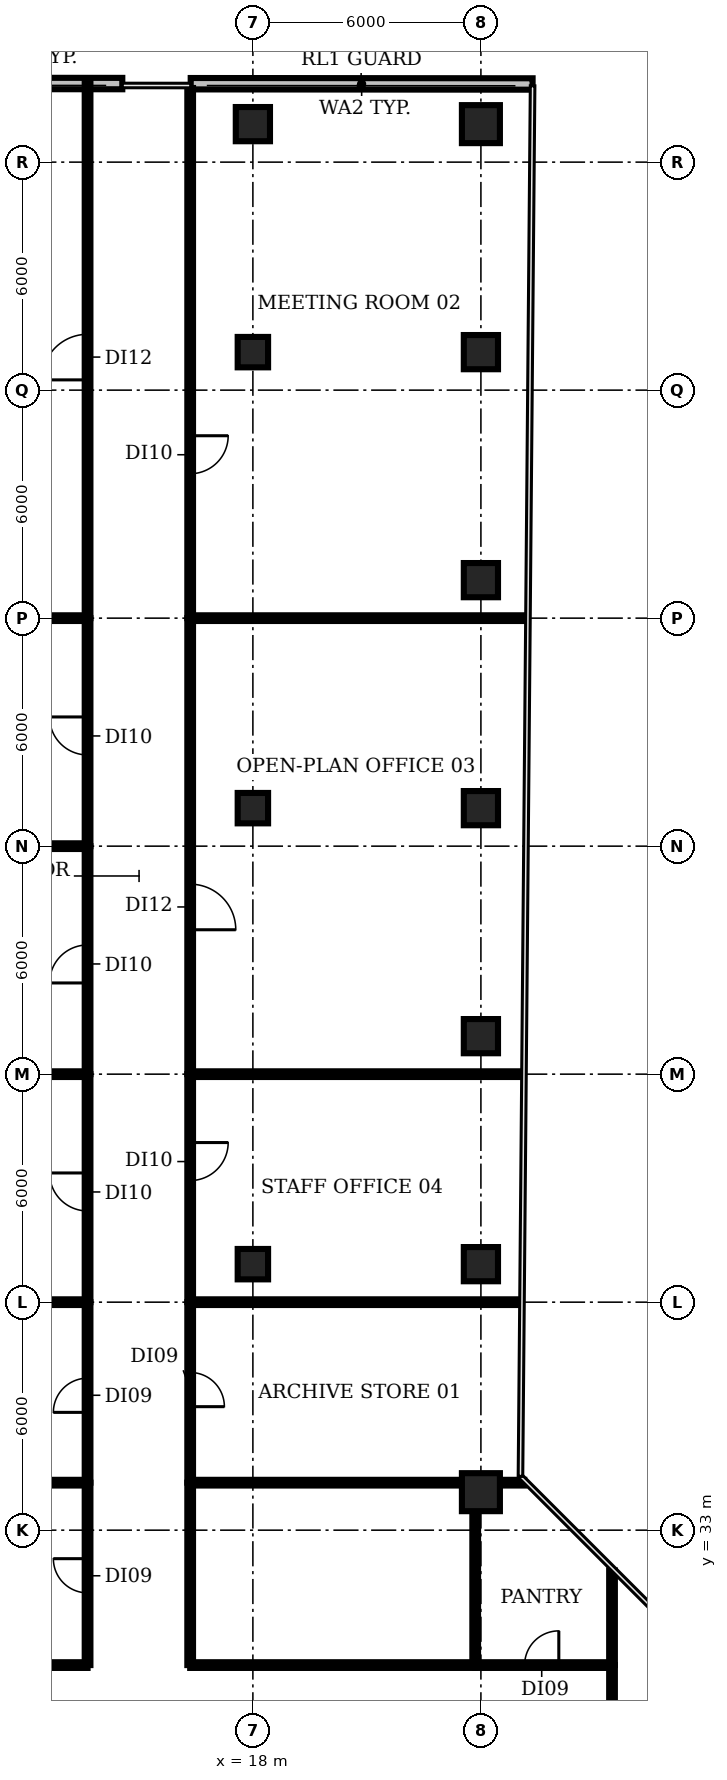
"""IFC4 building model, lengths in metres.
Left out: names, types, materials, properties, quantities, classifications, styles, units other than length and angle.
Written with IfcOpenShell. Run it as: python <this file> out.ifc"""

import sys

from ifc_helpers import new_model, si_unit, direction, frame, frame_2d, origin, origin_2d, place, context, subcontext, project, spatial, rectangle, circle, extrude, element, fill, save


model = new_model("IFC4")
c1 = context("Model", 3, precision=1e-05, world=origin(), true_north=direction((0.0, 1.0)))
c2 = subcontext(c1, "Body", "Model", "MODEL_VIEW")
j1 = project(units=[si_unit("LENGTHUNIT", "METRE"), si_unit("PLANEANGLEUNIT", "RADIAN")], contexts=[c1])
p1 = place(None, origin())
s1 = spatial("IfcSite", under=j1, at=p1, CompositionType="ELEMENT")
p2 = place(p1, origin())
s2 = spatial("IfcBuilding", under=s1, at=p2, CompositionType="ELEMENT")
p3 = place(p2, frame((0.0, 0.0, 113.0)))
s3 = spatial("IfcBuildingStorey", under=s2, at=p3, CompositionType="ELEMENT", Elevation=113.0)
for number, where, z_axis, x_axis in (
    (1, (18.0, 40.0, 0.0), (0.0, 0.0, 1.0), (1.0, 0.0, 0.0)),
    (2, (18.0, 52.0, 0.0), (0.0, 0.0, 1.0), (1.0, 0.0, 0.0)),
    (3, (18.0, 64.0, 0.0), (0.0, 0.0, 1.0), (1.0, 0.0, 0.0)),
):
    element("IfcColumn", number, at=place(p3, frame(where, z_axis=z_axis, x_axis=x_axis)), inside=s3, PredefinedType="COLUMN", context=c2, shape_type="SweptSolid", body=[
        extrude(rectangle(XDim=0.8, YDim=0.8, at=origin_2d()), origin(), (0.0, 0.0, 1.0), 3.85),
    ])
p4 = place(p3, frame((18.0, 70.0, 0.0), z_axis=(0.0, 0.0, 1.0), x_axis=(1.0, 0.0, 0.0)))
e4 = element("IfcColumn", 4, at=p4, inside=s3, PredefinedType="COLUMN", context=c2, shape_type="SweptSolid", body=[
    extrude(rectangle(XDim=0.9, YDim=0.9, at=origin_2d()), origin(), (0.0, 0.0, 1.0), 3.85),
])
p5 = place(p3, frame((24.0, 34.0, 0.0), z_axis=(0.0, 0.0, 1.0), x_axis=(1.0, 0.0, 0.0)))
e5 = element("IfcColumn", 5, at=p5, inside=s3, PredefinedType="COLUMN", context=c2, shape_type="SweptSolid", body=[
    extrude(circle(Radius=0.5, at=origin_2d()), origin(), (0.0, 0.0, 1.0), 3.85),
])
for number, where, z_axis, x_axis in (
    (6, (24.0, 40.0, 0.0), (0.0, 0.0, 1.0), (1.0, 0.0, 0.0)),
    (7, (24.0, 46.0, 0.0), (0.0, 0.0, 1.0), (1.0, 0.0, 0.0)),
    (8, (24.0, 52.0, 0.0), (0.0, 0.0, 1.0), (1.0, 0.0, 0.0)),
    (9, (24.0, 58.0, 0.0), (0.0, 0.0, 1.0), (1.0, 0.0, 0.0)),
    (10, (24.0, 64.0, 0.0), (0.0, 0.0, 1.0), (1.0, 0.0, 0.0)),
):
    element("IfcColumn", number, at=place(p3, frame(where, z_axis=z_axis, x_axis=x_axis)), inside=s3, PredefinedType="COLUMN", context=c2, shape_type="SweptSolid", body=[
        extrude(rectangle(XDim=0.9, YDim=0.9, at=origin_2d()), origin(), (0.0, 0.0, 1.0), 3.85),
    ])
p6 = place(p3, frame((24.0, 70.0, 0.0), z_axis=(0.0, 0.0, 1.0), x_axis=(1.0, 0.0, 0.0)))
e11 = element("IfcColumn", 11, at=p6, inside=s3, PredefinedType="COLUMN", context=c2, shape_type="SweptSolid", body=[
    extrude(circle(Radius=0.5, at=origin_2d()), origin(), (0.0, 0.0, 1.0), 3.85),
])
p7 = place(p3, frame((25.36, 71.056, 0.0), z_axis=(0.0, 0.0, 1.0), x_axis=(-0.999999668576, 0.00081415518, 0.0)))
e12 = element("IfcWall", 12, at=p7, inside=s3, PredefinedType="SOLIDWALL", context=c2, shape_type="SweptSolid", body=[
    extrude(rectangle(XDim=8.996, YDim=0.3, at=frame_2d((4.498, 0.0))), origin(), (0.0, 0.0, 1.0), 3.85),
])
p8 = place(p3, frame((14.564, 71.067, 0.0), z_axis=(0.0, 0.0, 1.0), x_axis=(-0.999999668533, 0.000814207658, 0.0)))
e13 = element("IfcWall", 13, at=p8, inside=s3, PredefinedType="SOLIDWALL", context=c2, shape_type="SweptSolid", body=[
    extrude(rectangle(XDim=4.798, YDim=0.3, at=frame_2d((2.399, 0.0))), origin(), (0.0, 0.0, 1.0), 3.85),
])
for number, where, z_axis, x_axis in (
    (14, (-0.98, 34.25, 0.0), (0.0, 0.0, 1.0), (1.0, 0.0, 0.0)),
    (15, (-0.98, 39.0, 0.0), (0.0, 0.0, 1.0), (1.0, 0.0, 0.0)),
    (16, (-0.98, 45.0, 0.0), (0.0, 0.0, 1.0), (1.0, 0.0, 0.0)),
    (17, (-0.98, 51.0, 0.0), (0.0, 0.0, 1.0), (1.0, 0.0, 0.0)),
    (18, (-0.98, 57.0, 0.0), (0.0, 0.0, 1.0), (1.0, 0.0, 0.0)),
):
    element("IfcWall", number, at=place(p3, frame(where, z_axis=z_axis, x_axis=x_axis)), inside=s3, PredefinedType="PARTITIONING", context=c2, shape_type="SweptSolid", body=[
        extrude(rectangle(XDim=14.63, YDim=0.15, at=frame_2d((7.315, 0.0))), origin(), (0.0, 0.0, 1.0), 2.83),
    ])
p9 = place(p3, frame((8.8, 29.45, 0.0), z_axis=(0.0, 0.0, 1.0), x_axis=(1.0, 0.0, 0.0)))
e19 = element("IfcWall", 19, at=p9, inside=s3, PredefinedType="PARTITIONING", context=c2, shape_type="SweptSolid", body=[
    extrude(rectangle(XDim=4.85, YDim=0.15, at=frame_2d((2.425, 0.0))), origin(), (0.0, 0.0, 1.0), 2.83),
])
p10 = place(p3, frame((13.65, 29.45, 0.0), z_axis=(0.0, 0.0, 1.0), x_axis=(0.0, 1.0, 0.0)))
e20 = element("IfcWall", 20, at=p10, inside=s3, PredefinedType="PARTITIONING", context=c2, shape_type="SweptSolid", body=[
    extrude(rectangle(XDim=4.8, YDim=0.15, at=frame_2d((2.4, 0.0))), origin(), (0.0, 0.0, 1.0), 2.83),
])
p11 = place(p10, frame((1.9, 0.0, 0.0)))
e21 = element("IfcOpeningElement", 21, at=p11, cuts=e20, PredefinedType="OPENING", context=c2, shape_type="SweptSolid", body=[
    extrude(rectangle(XDim=0.9, YDim=2.1, at=frame_2d((0.45, 1.05))), frame((0.0, 0.085, 0.0), z_axis=(0.0, -1.0, 0.0), x_axis=(1.0, 0.0, 0.0)), (0.0, 0.0, 1.0), 0.17),
])
p12 = place(p3, frame((13.65, 34.25, 0.0), z_axis=(0.0, 0.0, 1.0), x_axis=(0.0, 1.0, 0.0)))
e22 = element("IfcWall", 22, at=p12, inside=s3, PredefinedType="PARTITIONING", context=c2, shape_type="SweptSolid", body=[
    extrude(rectangle(XDim=4.75, YDim=0.15, at=frame_2d((2.375, 0.0))), origin(), (0.0, 0.0, 1.0), 2.83),
])
p13 = place(p12, frame((1.85, 0.0, 0.0)))
e23 = element("IfcOpeningElement", 23, at=p13, cuts=e22, PredefinedType="OPENING", context=c2, shape_type="SweptSolid", body=[
    extrude(rectangle(XDim=0.9, YDim=2.1, at=frame_2d((0.45, 1.05))), frame((0.0, 0.085, 0.0), z_axis=(0.0, -1.0, 0.0), x_axis=(1.0, 0.0, 0.0)), (0.0, 0.0, 1.0), 0.17),
])
p14 = place(p3, frame((13.65, 39.0, 0.0), z_axis=(0.0, 0.0, 1.0), x_axis=(0.0, 1.0, 0.0)))
e24 = element("IfcWall", 24, at=p14, inside=s3, PredefinedType="PARTITIONING", context=c2, shape_type="SweptSolid", body=[
    extrude(rectangle(XDim=6.0, YDim=0.15, at=frame_2d((3.0, 0.0))), origin(), (0.0, 0.0, 1.0), 2.83),
])
p15 = place(p14, frame((2.4, 0.0, 0.0)))
e25 = element("IfcOpeningElement", 25, at=p15, cuts=e24, PredefinedType="OPENING", context=c2, shape_type="SweptSolid", body=[
    extrude(rectangle(XDim=1.0, YDim=2.1, at=frame_2d((0.5, 1.05))), frame((0.0, 0.085, 0.0), z_axis=(0.0, -1.0, 0.0), x_axis=(1.0, 0.0, 0.0)), (0.0, 0.0, 1.0), 0.17),
])
p16 = place(p3, frame((13.65, 45.0, 0.0), z_axis=(0.0, 0.0, 1.0), x_axis=(0.0, 1.0, 0.0)))
e26 = element("IfcWall", 26, at=p16, inside=s3, PredefinedType="PARTITIONING", context=c2, shape_type="SweptSolid", body=[
    extrude(rectangle(XDim=6.0, YDim=0.15, at=frame_2d((3.0, 0.0))), origin(), (0.0, 0.0, 1.0), 2.83),
])
p17 = place(p16, frame((2.4, 0.0, 0.0)))
e27 = element("IfcOpeningElement", 27, at=p17, cuts=e26, PredefinedType="OPENING", context=c2, shape_type="SweptSolid", body=[
    extrude(rectangle(XDim=1.0, YDim=2.1, at=frame_2d((0.5, 1.05))), frame((0.0, 0.085, 0.0), z_axis=(0.0, -1.0, 0.0), x_axis=(1.0, 0.0, 0.0)), (0.0, 0.0, 1.0), 0.17),
])
p18 = place(p3, frame((13.65, 51.0, 0.0), z_axis=(0.0, 0.0, 1.0), x_axis=(0.0, 1.0, 0.0)))
e28 = element("IfcWall", 28, at=p18, inside=s3, PredefinedType="PARTITIONING", context=c2, shape_type="SweptSolid", body=[
    extrude(rectangle(XDim=6.0, YDim=0.15, at=frame_2d((3.0, 0.0))), origin(), (0.0, 0.0, 1.0), 2.83),
])
p19 = place(p18, frame((2.4, 0.0, 0.0)))
e29 = element("IfcOpeningElement", 29, at=p19, cuts=e28, PredefinedType="OPENING", context=c2, shape_type="SweptSolid", body=[
    extrude(rectangle(XDim=1.0, YDim=2.1, at=frame_2d((0.5, 1.05))), frame((0.0, 0.085, 0.0), z_axis=(0.0, -1.0, 0.0), x_axis=(1.0, 0.0, 0.0)), (0.0, 0.0, 1.0), 0.17),
])
p20 = place(p3, frame((13.65, 57.0, 0.0), z_axis=(0.0, 0.0, 1.0), x_axis=(0.0, 1.0, 0.0)))
e30 = element("IfcWall", 30, at=p20, inside=s3, PredefinedType="PARTITIONING", context=c2, shape_type="SweptSolid", body=[
    extrude(rectangle(XDim=14.078, YDim=0.15, at=frame_2d((7.039, 0.0))), origin(), (0.0, 0.0, 1.0), 2.83),
])
p21 = place(p20, frame((6.27, 0.0, 0.0)))
e31 = element("IfcOpeningElement", 31, at=p21, cuts=e30, PredefinedType="OPENING", context=c2, shape_type="SweptSolid", body=[
    extrude(rectangle(XDim=1.2, YDim=2.1, at=frame_2d((0.6, 1.05))), frame((0.0, 0.085, 0.0), z_axis=(0.0, -1.0, 0.0), x_axis=(1.0, 0.0, 0.0)), (0.0, 0.0, 1.0), 0.17),
])
p22 = place(p3, frame((16.35, 29.45, 0.0), z_axis=(0.0, 0.0, 1.0), x_axis=(0.0, 1.0, 0.0)))
e32 = element("IfcWall", 32, at=p22, inside=s3, PredefinedType="PARTITIONING", context=c2, shape_type="SweptSolid", body=[
    extrude(rectangle(XDim=4.8, YDim=0.15, at=frame_2d((2.4, 0.0))), origin(), (0.0, 0.0, 1.0), 2.83),
])
p23 = place(p3, frame((16.35, 29.45, 0.0), z_axis=(0.0, 0.0, 1.0), x_axis=(1.0, 0.0, 0.0)))
e33 = element("IfcWall", 33, at=p23, inside=s3, PredefinedType="PARTITIONING", context=c2, shape_type="SweptSolid", body=[
    extrude(rectangle(XDim=7.5, YDim=0.15, at=frame_2d((3.75, 0.0))), origin(), (0.0, 0.0, 1.0), 2.83),
])
p24 = place(p3, frame((16.35, 34.25, 0.0), z_axis=(0.0, 0.0, 1.0), x_axis=(1.0, 0.0, 0.0)))
e34 = element("IfcWall", 34, at=p24, inside=s3, PredefinedType="PARTITIONING", context=c2, shape_type="SweptSolid", body=[
    extrude(rectangle(XDim=8.79, YDim=0.15, at=frame_2d((4.395, 0.0))), origin(), (0.0, 0.0, 1.0), 2.83),
])
p25 = place(p3, frame((16.35, 39.0, 0.0), z_axis=(0.0, 0.0, 1.0), x_axis=(0.0, -1.0, 0.0)))
e35 = element("IfcWall", 35, at=p25, inside=s3, PredefinedType="PARTITIONING", context=c2, shape_type="SweptSolid", body=[
    extrude(rectangle(XDim=4.75, YDim=0.15, at=frame_2d((2.375, 0.0))), origin(), (0.0, 0.0, 1.0), 2.83),
])
p26 = place(p25, frame((1.85, 0.0, 0.0)))
e36 = element("IfcOpeningElement", 36, at=p26, cuts=e35, PredefinedType="OPENING", context=c2, shape_type="SweptSolid", body=[
    extrude(rectangle(XDim=0.9, YDim=2.1, at=frame_2d((0.45, 1.05))), frame((0.0, 0.085, 0.0), z_axis=(0.0, -1.0, 0.0), x_axis=(1.0, 0.0, 0.0)), (0.0, 0.0, 1.0), 0.17),
])
p27 = place(p3, frame((16.35, 39.0, 0.0), z_axis=(0.0, 0.0, 1.0), x_axis=(1.0, 0.0, 0.0)))
e37 = element("IfcWall", 37, at=p27, inside=s3, PredefinedType="PARTITIONING", context=c2, shape_type="SweptSolid", body=[
    extrude(rectangle(XDim=8.68, YDim=0.15, at=frame_2d((4.34, 0.0))), origin(), (0.0, 0.0, 1.0), 2.83),
])
p28 = place(p3, frame((16.35, 45.0, 0.0), z_axis=(0.0, 0.0, 1.0), x_axis=(0.0, -1.0, 0.0)))
e38 = element("IfcWall", 38, at=p28, inside=s3, PredefinedType="PARTITIONING", context=c2, shape_type="SweptSolid", body=[
    extrude(rectangle(XDim=6.0, YDim=0.15, at=frame_2d((3.0, 0.0))), origin(), (0.0, 0.0, 1.0), 2.83),
])
p29 = place(p28, frame((1.8, 0.0, 0.0)))
e39 = element("IfcOpeningElement", 39, at=p29, cuts=e38, PredefinedType="OPENING", context=c2, shape_type="SweptSolid", body=[
    extrude(rectangle(XDim=1.0, YDim=2.1, at=frame_2d((0.5, 1.05))), frame((0.0, 0.085, 0.0), z_axis=(0.0, -1.0, 0.0), x_axis=(1.0, 0.0, 0.0)), (0.0, 0.0, 1.0), 0.17),
])
p30 = place(p3, frame((16.35, 45.0, 0.0), z_axis=(0.0, 0.0, 1.0), x_axis=(1.0, 0.0, 0.0)))
e40 = element("IfcWall", 40, at=p30, inside=s3, PredefinedType="PARTITIONING", context=c2, shape_type="SweptSolid", body=[
    extrude(rectangle(XDim=8.73, YDim=0.15, at=frame_2d((4.365, 0.0))), origin(), (0.0, 0.0, 1.0), 2.83),
])
p31 = place(p3, frame((16.35, 57.0, 0.0), z_axis=(0.0, 0.0, 1.0), x_axis=(0.0, -1.0, 0.0)))
e41 = element("IfcWall", 41, at=p31, inside=s3, PredefinedType="PARTITIONING", context=c2, shape_type="SweptSolid", body=[
    extrude(rectangle(XDim=12.0, YDim=0.15, at=frame_2d((6.0, 0.0))), origin(), (0.0, 0.0, 1.0), 2.83),
])
p32 = place(p31, frame((7.0, 0.0, 0.0)))
e42 = element("IfcOpeningElement", 42, at=p32, cuts=e41, PredefinedType="OPENING", context=c2, shape_type="SweptSolid", body=[
    extrude(rectangle(XDim=1.2, YDim=2.1, at=frame_2d((0.6, 1.05))), frame((0.0, 0.085, 0.0), z_axis=(0.0, -1.0, 0.0), x_axis=(1.0, 0.0, 0.0)), (0.0, 0.0, 1.0), 0.17),
])
p33 = place(p3, frame((16.35, 57.0, 0.0), z_axis=(0.0, 0.0, 1.0), x_axis=(1.0, 0.0, 0.0)))
e43 = element("IfcWall", 43, at=p33, inside=s3, PredefinedType="PARTITIONING", context=c2, shape_type="SweptSolid", body=[
    extrude(rectangle(XDim=8.84, YDim=0.15, at=frame_2d((4.42, 0.0))), origin(), (0.0, 0.0, 1.0), 2.83),
])
p34 = place(p3, frame((16.35, 70.951, 0.0), z_axis=(0.0, 0.0, 1.0), x_axis=(0.0, -1.0, 0.0)))
e44 = element("IfcWall", 44, at=p34, inside=s3, PredefinedType="PARTITIONING", context=c2, shape_type="SweptSolid", body=[
    extrude(rectangle(XDim=13.951, YDim=0.15, at=frame_2d((6.975, 0.0))), origin(), (0.0, 0.0, 1.0), 2.83),
])
p35 = place(p34, frame((9.151, 0.0, 0.0)))
e45 = element("IfcOpeningElement", 45, at=p35, cuts=e44, PredefinedType="OPENING", context=c2, shape_type="SweptSolid", body=[
    extrude(rectangle(XDim=1.0, YDim=2.1, at=frame_2d((0.5, 1.05))), frame((0.0, 0.085, 0.0), z_axis=(0.0, -1.0, 0.0), x_axis=(1.0, 0.0, 0.0)), (0.0, 0.0, 1.0), 0.17),
])
p36 = place(p3, frame((23.85, 29.45, 0.0), z_axis=(0.0, 0.0, 1.0), x_axis=(0.0, 1.0, 0.0)))
e46 = element("IfcWall", 46, at=p36, inside=s3, PredefinedType="PARTITIONING", context=c2, shape_type="SweptSolid", body=[
    extrude(rectangle(XDim=4.8, YDim=0.15, at=frame_2d((2.4, 0.0))), origin(), (0.0, 0.0, 1.0), 2.83),
])
p37 = place(p3, frame((23.85, 29.45, 0.0), z_axis=(0.0, 0.0, 1.0), x_axis=(1.0, 0.0, 0.0)))
e47 = element("IfcWall", 47, at=p37, inside=s3, PredefinedType="PARTITIONING", context=c2, shape_type="SweptSolid", body=[
    extrude(rectangle(XDim=3.6, YDim=0.15, at=frame_2d((1.8, 0.0))), origin(), (0.0, 0.0, 1.0), 2.83),
])
p38 = place(p37, frame((1.3, 0.0, 0.0)))
e48 = element("IfcOpeningElement", 48, at=p38, cuts=e47, PredefinedType="OPENING", context=c2, shape_type="SweptSolid", body=[
    extrude(rectangle(XDim=0.9, YDim=2.1, at=frame_2d((0.45, 1.05))), frame((0.0, 0.085, 0.0), z_axis=(0.0, -1.0, 0.0), x_axis=(1.0, 0.0, 0.0)), (0.0, 0.0, 1.0), 0.17),
])
p39 = place(p3, frame((27.45, 25.55, 0.0), z_axis=(0.0, 0.0, 1.0), x_axis=(0.0, 1.0, 0.0)))
e49 = element("IfcWall", 49, at=p39, inside=s3, PredefinedType="PARTITIONING", context=c2, shape_type="SweptSolid", body=[
    extrude(rectangle(XDim=3.9, YDim=0.15, at=frame_2d((1.95, 0.0))), origin(), (0.0, 0.0, 1.0), 2.83),
])
p40 = place(p3, frame((27.45, 29.45, 0.0), z_axis=(0.0, 0.0, 1.0), x_axis=(0.0, 1.0, 0.0)))
e50 = element("IfcWall", 50, at=p40, inside=s3, PredefinedType="PARTITIONING", context=c2, shape_type="SweptSolid", body=[
    extrude(rectangle(XDim=2.49, YDim=0.15, at=frame_2d((1.245, 0.0))), origin(), (0.0, 0.0, 1.0), 2.83),
])
p41 = place(p11, origin())
e51 = element("IfcDoor", 51, at=p41, inside=s3, OperationType="SINGLE_SWING_RIGHT", PredefinedType="DOOR", context=c2, shape_type="SweptSolid", body=[
    extrude(rectangle(XDim=0.9, YDim=2.1, at=frame_2d((0.45, 1.05))), frame((0.0, 0.025, 0.0), z_axis=(0.0, -1.0, 0.0), x_axis=(1.0, 0.0, 0.0)), (0.0, 0.0, 1.0), 0.05),
])
fill(e21, e51)
p42 = place(p13, origin())
e52 = element("IfcDoor", 52, at=p42, inside=s3, OperationType="SINGLE_SWING_LEFT", PredefinedType="DOOR", context=c2, shape_type="SweptSolid", body=[
    extrude(rectangle(XDim=0.9, YDim=2.1, at=frame_2d((0.45, 1.05))), frame((0.0, 0.025, 0.0), z_axis=(0.0, -1.0, 0.0), x_axis=(1.0, 0.0, 0.0)), (0.0, 0.0, 1.0), 0.05),
])
fill(e23, e52)
p43 = place(p15, origin())
e53 = element("IfcDoor", 53, at=p43, inside=s3, OperationType="SINGLE_SWING_RIGHT", PredefinedType="DOOR", context=c2, shape_type="SweptSolid", body=[
    extrude(rectangle(XDim=1.0, YDim=2.1, at=frame_2d((0.5, 1.05))), frame((0.0, 0.025, 0.0), z_axis=(0.0, -1.0, 0.0), x_axis=(1.0, 0.0, 0.0)), (0.0, 0.0, 1.0), 0.05),
])
fill(e25, e53)
p44 = place(p17, origin())
e54 = element("IfcDoor", 54, at=p44, inside=s3, OperationType="SINGLE_SWING_LEFT", PredefinedType="DOOR", context=c2, shape_type="SweptSolid", body=[
    extrude(rectangle(XDim=1.0, YDim=2.1, at=frame_2d((0.5, 1.05))), frame((0.0, 0.025, 0.0), z_axis=(0.0, -1.0, 0.0), x_axis=(1.0, 0.0, 0.0)), (0.0, 0.0, 1.0), 0.05),
])
fill(e27, e54)
p45 = place(p19, origin())
e55 = element("IfcDoor", 55, at=p45, inside=s3, OperationType="SINGLE_SWING_RIGHT", PredefinedType="DOOR", context=c2, shape_type="SweptSolid", body=[
    extrude(rectangle(XDim=1.0, YDim=2.1, at=frame_2d((0.5, 1.05))), frame((0.0, 0.025, 0.0), z_axis=(0.0, -1.0, 0.0), x_axis=(1.0, 0.0, 0.0)), (0.0, 0.0, 1.0), 0.05),
])
fill(e29, e55)
p46 = place(p21, origin())
e56 = element("IfcDoor", 56, at=p46, inside=s3, OperationType="SINGLE_SWING_LEFT", PredefinedType="DOOR", context=c2, shape_type="SweptSolid", body=[
    extrude(rectangle(XDim=1.2, YDim=2.1, at=frame_2d((0.6, 1.05))), frame((0.0, 0.025, 0.0), z_axis=(0.0, -1.0, 0.0), x_axis=(1.0, 0.0, 0.0)), (0.0, 0.0, 1.0), 0.05),
])
fill(e31, e56)
p47 = place(p26, origin())
e57 = element("IfcDoor", 57, at=p47, inside=s3, OperationType="SINGLE_SWING_RIGHT", PredefinedType="DOOR", context=c2, shape_type="SweptSolid", body=[
    extrude(rectangle(XDim=0.9, YDim=2.1, at=frame_2d((0.45, 1.05))), frame((0.0, 0.025, 0.0), z_axis=(0.0, -1.0, 0.0), x_axis=(1.0, 0.0, 0.0)), (0.0, 0.0, 1.0), 0.05),
])
fill(e36, e57)
p48 = place(p29, origin())
e58 = element("IfcDoor", 58, at=p48, inside=s3, OperationType="SINGLE_SWING_LEFT", PredefinedType="DOOR", context=c2, shape_type="SweptSolid", body=[
    extrude(rectangle(XDim=1.0, YDim=2.1, at=frame_2d((0.5, 1.05))), frame((0.0, 0.025, 0.0), z_axis=(0.0, -1.0, 0.0), x_axis=(1.0, 0.0, 0.0)), (0.0, 0.0, 1.0), 0.05),
])
fill(e39, e58)
p49 = place(p32, origin())
e59 = element("IfcDoor", 59, at=p49, inside=s3, OperationType="SINGLE_SWING_RIGHT", PredefinedType="DOOR", context=c2, shape_type="SweptSolid", body=[
    extrude(rectangle(XDim=1.2, YDim=2.1, at=frame_2d((0.6, 1.05))), frame((0.0, 0.025, 0.0), z_axis=(0.0, -1.0, 0.0), x_axis=(1.0, 0.0, 0.0)), (0.0, 0.0, 1.0), 0.05),
])
fill(e42, e59)
p50 = place(p35, origin())
e60 = element("IfcDoor", 60, at=p50, inside=s3, OperationType="SINGLE_SWING_LEFT", PredefinedType="DOOR", context=c2, shape_type="SweptSolid", body=[
    extrude(rectangle(XDim=1.0, YDim=2.1, at=frame_2d((0.5, 1.05))), frame((0.0, 0.025, 0.0), z_axis=(0.0, -1.0, 0.0), x_axis=(1.0, 0.0, 0.0)), (0.0, 0.0, 1.0), 0.05),
])
fill(e45, e60)
p51 = place(p38, origin())
e61 = element("IfcDoor", 61, at=p51, inside=s3, OperationType="SINGLE_SWING_RIGHT", PredefinedType="DOOR", context=c2, shape_type="SweptSolid", body=[
    extrude(rectangle(XDim=0.9, YDim=2.1, at=frame_2d((0.45, 1.05))), frame((0.0, 0.025, 0.0), z_axis=(0.0, -1.0, 0.0), x_axis=(1.0, 0.0, 0.0)), (0.0, 0.0, 1.0), 0.05),
])
fill(e48, e61)
save(model, sys.argv[1])
